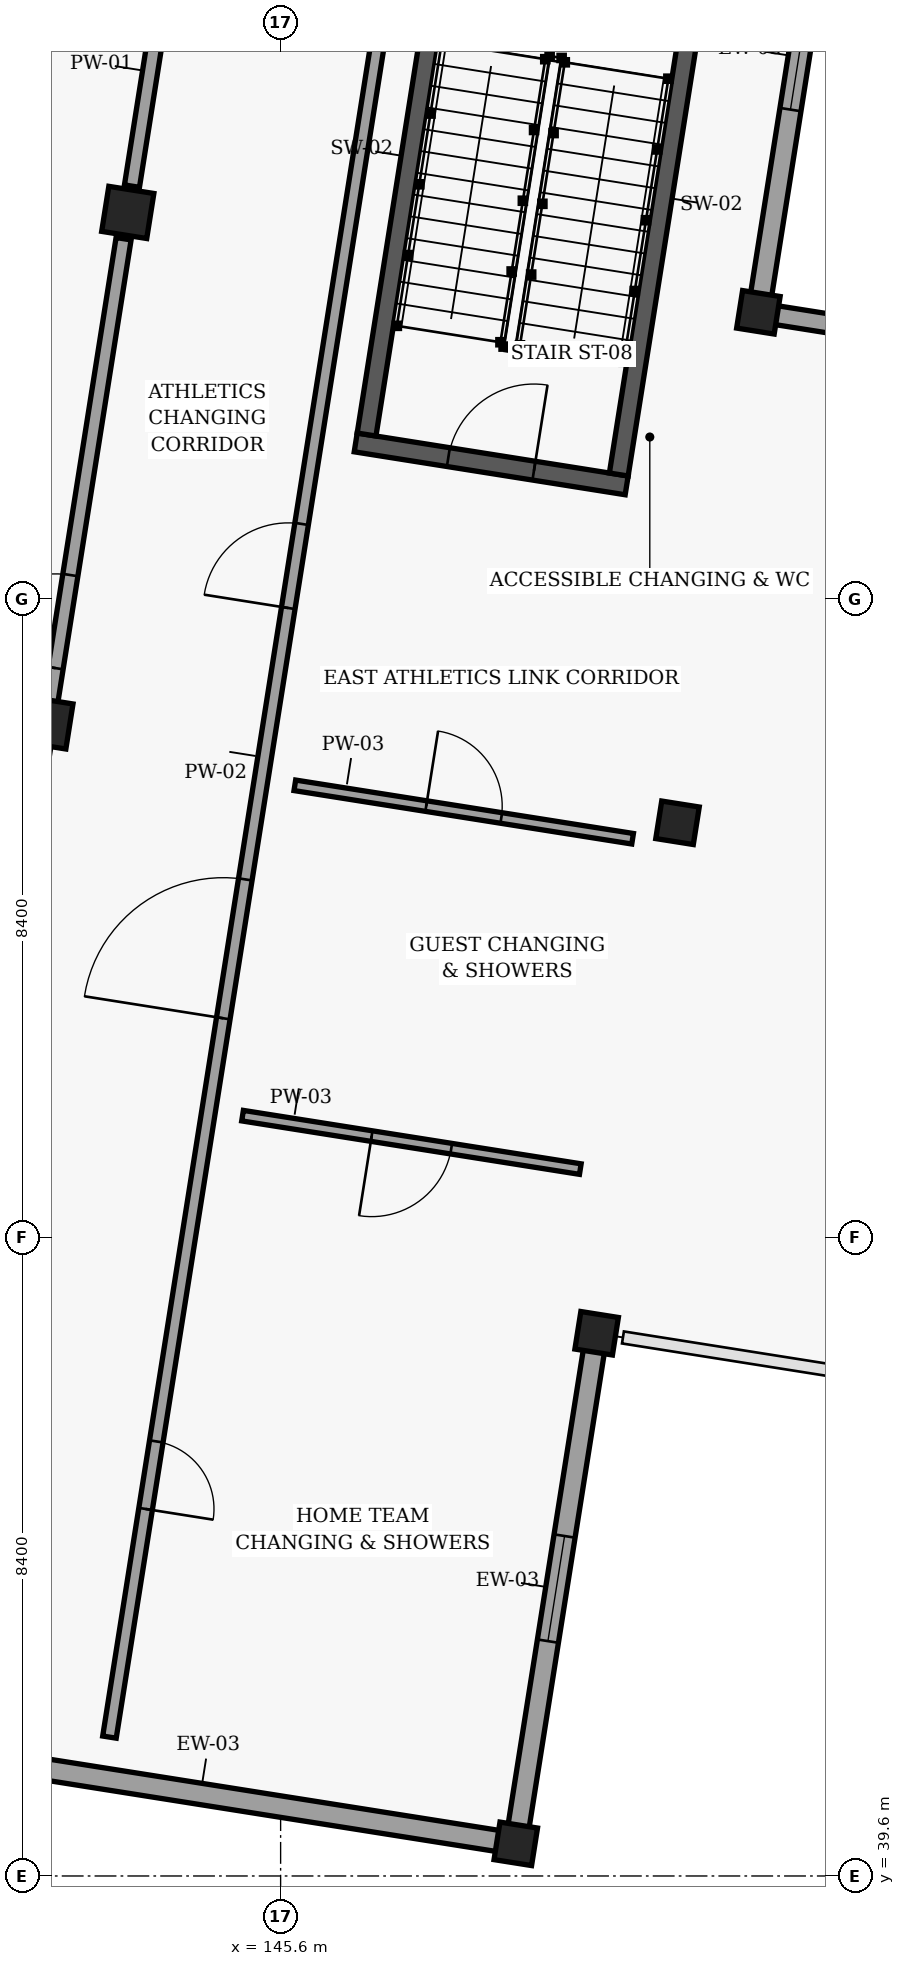
"""IFC4 building model, lengths in metres.
Left out: names, types, materials, properties, quantities, classifications, styles, units other than length and angle.
Written with IfcOpenShell. Run it as: python <this file> out.ifc"""

import sys

from ifc_helpers import new_model, si_unit, direction, frame, frame_2d, origin, origin_2d, place, context, subcontext, project, spatial, rectangle, extrude, element, fill, save


model = new_model("IFC4")
c1 = context("Model", 3, precision=1e-05, world=origin(), true_north=direction((0.0, 1.0)))
c2 = subcontext(c1, "Body", "Model", "MODEL_VIEW")
j1 = project(units=[si_unit("LENGTHUNIT", "METRE"), si_unit("PLANEANGLEUNIT", "RADIAN")], contexts=[c1])
p1 = place(None, origin())
s1 = spatial("IfcSite", under=j1, at=p1, CompositionType="ELEMENT")
p2 = place(p1, origin())
s2 = spatial("IfcBuilding", under=s1, at=p2, CompositionType="ELEMENT")
p3 = place(p2, origin())
s3 = spatial("IfcBuildingStorey", under=s2, at=p3, CompositionType="ELEMENT", Elevation=0.0)
for number, where, z_axis, x_axis in (
    (1, (142.525, 54.77, 0.0), (0.0, 0.0, 1.0), (0.988, -0.156, 0.0)),
    (2, (143.589, 61.486, 0.0), (0.0, 0.0, 1.0), (0.988, -0.156, 0.0)),
):
    element("IfcColumn", number, at=place(p3, frame(where, z_axis=z_axis, x_axis=x_axis)), inside=s3, PredefinedType="COLUMN", context=c2, shape_type="SweptSolid", body=[
        extrude(rectangle(XDim=0.6, YDim=0.6, at=origin_2d()), origin(), (0.0, 0.0, 1.0), 4.8),
    ])
for number, where, z_axis, x_axis in (
    (3, (148.694, 40.023, 0.0), (0.0, 0.0, 1.0), (0.988, -0.156, 0.0)),
    (4, (149.758, 46.74, 0.0), (0.0, 0.0, 1.0), (0.988, -0.156, 0.0)),
    (5, (150.822, 53.456, 0.0), (0.0, 0.0, 1.0), (0.988, -0.156, 0.0)),
    (6, (151.886, 60.172, 0.0), (0.0, 0.0, 1.0), (0.988, -0.156, 0.0)),
):
    element("IfcColumn", number, at=place(p3, frame(where, z_axis=z_axis, x_axis=x_axis)), inside=s3, PredefinedType="COLUMN", context=c2, shape_type="SweptSolid", body=[
        extrude(rectangle(XDim=0.5, YDim=0.5, at=origin_2d()), origin(), (0.0, 0.0, 1.0), 4.8),
    ])
p4 = place(p3, frame((148.71, 40.122, 0.0), z_axis=(0.0, 0.0, 1.0), x_axis=(0.156500089252, 0.987677944506, 0.0)))
e7 = element("IfcWall", 7, at=p4, inside=s3, PredefinedType="SOLIDWALL", context=c2, shape_type="SweptSolid", body=[
    extrude(rectangle(XDim=6.6, YDim=0.28, at=frame_2d((3.3, 0.0))), origin(), (0.0, 0.0, 1.0), 3.928),
])
p5 = place(p4, frame((2.6, 0.0, 1.35)))
e8 = element("IfcOpeningElement", 8, at=p5, cuts=e7, PredefinedType="OPENING", context=c2, shape_type="SweptSolid", body=[
    extrude(rectangle(XDim=1.4, YDim=1.2, at=frame_2d((0.7, 0.6))), frame((0.0, 0.15, 0.0), z_axis=(0.0, -1.0, 0.0), x_axis=(1.0, 0.0, 0.0)), (0.0, 0.0, 1.0), 0.3),
])
p6 = place(p3, frame((151.901, 60.271, 0.0), z_axis=(0.0, 0.0, 1.0), x_axis=(0.156536171909, 0.987672226442, 0.0)))
e9 = element("IfcWall", 9, at=p6, inside=s3, PredefinedType="SOLIDWALL", context=c2, shape_type="SweptSolid", body=[
    extrude(rectangle(XDim=6.6, YDim=0.28, at=frame_2d((3.3, 0.0))), origin(), (0.0, 0.0, 1.0), 3.928),
])
p7 = place(p6, frame((2.6, 0.0, 1.35)))
e10 = element("IfcOpeningElement", 10, at=p7, cuts=e9, PredefinedType="OPENING", context=c2, shape_type="SweptSolid", body=[
    extrude(rectangle(XDim=1.4, YDim=1.2, at=frame_2d((0.7, 0.6))), frame((0.0, 0.15, 0.0), z_axis=(0.0, -1.0, 0.0), x_axis=(1.0, 0.0, 0.0)), (0.0, 0.0, 1.0), 0.3),
])
p8 = place(p3, frame((140.477, 41.324, 0.0), z_axis=(0.0, 0.0, 1.0), x_axis=(0.98770403257, -0.156335357629, 0.0)))
e11 = element("IfcWall", 11, at=p8, inside=s3, PredefinedType="SOLIDWALL", context=c2, shape_type="SweptSolid", body=[
    extrude(rectangle(XDim=8.239, YDim=0.28, at=frame_2d((4.12, 0.0))), origin(), (0.0, 0.0, 1.0), 4.006),
])
p9 = place(p3, frame((151.965, 60.159, 0.0), z_axis=(0.0, 0.0, 1.0), x_axis=(0.987699982026, -0.156360946233, 0.0)))
e12 = element("IfcWall", 12, at=p9, inside=s3, PredefinedType="SOLIDWALL", context=c2, shape_type="SweptSolid", body=[
    extrude(rectangle(XDim=8.339, YDim=0.25, at=frame_2d((4.17, 0.0))), origin(), (0.0, 0.0, 1.0), 4.375),
])
p10 = place(p9, frame((1.98, 0.0, 0.9)))
e13 = element("IfcOpeningElement", 13, at=p10, cuts=e12, PredefinedType="OPENING", context=c2, shape_type="SweptSolid", body=[
    extrude(rectangle(XDim=1.6, YDim=2.1, at=frame_2d((0.8, 1.05))), frame((0.0, 0.135, 0.0), z_axis=(0.0, -1.0, 0.0), x_axis=(1.0, 0.0, 0.0)), (0.0, 0.0, 1.0), 0.27),
])
p11 = place(p9, frame((4.76, 0.0, 0.9)))
e14 = element("IfcOpeningElement", 14, at=p11, cuts=e12, PredefinedType="OPENING", context=c2, shape_type="SweptSolid", body=[
    extrude(rectangle(XDim=1.6, YDim=2.1, at=frame_2d((0.8, 1.05))), frame((0.0, 0.135, 0.0), z_axis=(0.0, -1.0, 0.0), x_axis=(1.0, 0.0, 0.0)), (0.0, 0.0, 1.0), 0.27),
])
p12 = place(p3, frame((150.153, 57.895, 0.0), z_axis=(0.0, 0.0, 1.0), x_axis=(-0.987676717047, 0.156507835599, 0.0)))
e15 = element("IfcWall", 15, at=p12, inside=s3, PredefinedType="SHEAR", context=c2, shape_type="SweptSolid", body=[
    extrude(rectangle(XDim=3.61, YDim=0.25, at=frame_2d((1.805, 0.0))), origin(), (0.0, 0.0, 1.0), 4.56),
])
p13 = place(p12, frame((1.235, 0.0, 0.0)))
e16 = element("IfcOpeningElement", 16, at=p13, cuts=e15, PredefinedType="OPENING", context=c2, shape_type="SweptSolid", body=[
    extrude(rectangle(XDim=1.14, YDim=2.15, at=frame_2d((0.57, 1.075))), frame((0.0, 0.135, 0.0), z_axis=(0.0, -1.0, 0.0), x_axis=(1.0, 0.0, 0.0)), (0.0, 0.0, 1.0), 0.27),
])
p14 = place(p3, frame((146.731, 58.564, 0.0), z_axis=(0.0, 0.0, 1.0), x_axis=(0.15642738738, 0.98768946156, 0.0)))
e17 = element("IfcWall", 17, at=p14, inside=s3, PredefinedType="SHEAR", context=c2, shape_type="SweptSolid", body=[
    extrude(rectangle(XDim=7.39, YDim=0.25, at=frame_2d((3.695, 0.0))), origin(), (0.0, 0.0, 1.0), 4.56),
])
p15 = place(p3, frame((151.205, 65.337, 0.0), z_axis=(0.0, 0.0, 1.0), x_axis=(-0.156432491725, -0.987688653136, 0.0)))
e18 = element("IfcWall", 18, at=p15, inside=s3, PredefinedType="SHEAR", context=c2, shape_type="SweptSolid", body=[
    extrude(rectangle(XDim=7.39, YDim=0.25, at=frame_2d((3.695, 0.0))), origin(), (0.0, 0.0, 1.0), 4.56),
])
p16 = place(p3, frame((141.517, 48.4, 0.0), z_axis=(0.0, 0.0, 1.0), x_axis=(0.156361063903, 0.987699963397, 0.0)))
e19 = element("IfcWall", 19, at=p16, inside=s3, PredefinedType="PARTITIONING", context=c2, shape_type="SweptSolid", body=[
    extrude(rectangle(XDim=12.899, YDim=0.2, at=frame_2d((6.449, 0.0))), origin(), (0.0, 0.0, 1.0), 3.928),
])
p17 = place(p16, frame((7.179, 0.0, 0.0)))
e20 = element("IfcOpeningElement", 20, at=p17, cuts=e19, PredefinedType="OPENING", context=c2, shape_type="SweptSolid", body=[
    extrude(rectangle(XDim=1.24, YDim=2.2, at=frame_2d((0.62, 1.1))), frame((0.0, 0.11, 0.0), z_axis=(0.0, -1.0, 0.0), x_axis=(1.0, 0.0, 0.0)), (0.0, 0.0, 1.0), 0.22),
])
p18 = place(p3, frame((143.644, 61.832, 0.0), z_axis=(0.0, 0.0, 1.0), x_axis=(0.156396286335, 0.987694386752, 0.0)))
e21 = element("IfcWall", 21, at=p18, inside=s3, PredefinedType="PARTITIONING", context=c2, shape_type="SweptSolid", body=[
    extrude(rectangle(XDim=6.099, YDim=0.2, at=frame_2d((3.049, 0.0))), origin(), (0.0, 0.0, 1.0), 3.928),
])
p19 = place(p18, frame((2.37, 0.0, 0.0)))
e22 = element("IfcOpeningElement", 22, at=p19, cuts=e21, PredefinedType="OPENING", context=c2, shape_type="SweptSolid", body=[
    extrude(rectangle(XDim=1.36, YDim=2.22, at=frame_2d((0.68, 1.11))), frame((0.0, 0.11, 0.0), z_axis=(0.0, -1.0, 0.0), x_axis=(1.0, 0.0, 0.0)), (0.0, 0.0, 1.0), 0.22),
])
p20 = place(p3, frame((143.348, 41.427, 0.0), z_axis=(0.0, 0.0, 1.0), x_axis=(0.156440506918, 0.987687383637, 0.0)))
e23 = element("IfcWall", 23, at=p20, inside=s3, PredefinedType="PARTITIONING", context=c2, shape_type="SweptSolid", body=[
    extrude(rectangle(XDim=26.099, YDim=0.18, at=frame_2d((13.05, 0.0))), origin(), (0.0, 0.0, 1.0), 4.006),
])
p21 = place(p20, frame((9.575, 0.0, 0.0)))
e24 = element("IfcOpeningElement", 24, at=p21, cuts=e23, PredefinedType="OPENING", context=c2, shape_type="SweptSolid", body=[
    extrude(rectangle(XDim=1.85, YDim=2.22, at=frame_2d((0.925, 1.11))), frame((0.0, 0.1, 0.0), z_axis=(0.0, -1.0, 0.0), x_axis=(1.0, 0.0, 0.0)), (0.0, 0.0, 1.0), 0.2),
])
p22 = place(p20, frame((15.04, 0.0, 0.0)))
e25 = element("IfcOpeningElement", 25, at=p22, cuts=e23, PredefinedType="OPENING", context=c2, shape_type="SweptSolid", body=[
    extrude(rectangle(XDim=1.12, YDim=2.16, at=frame_2d((0.56, 1.08))), frame((0.0, 0.1, 0.0), z_axis=(0.0, -1.0, 0.0), x_axis=(1.0, 0.0, 0.0)), (0.0, 0.0, 1.0), 0.2),
])
p23 = place(p20, frame((3.039, 0.0, 0.0)))
e26 = element("IfcOpeningElement", 26, at=p23, cuts=e23, PredefinedType="OPENING", context=c2, shape_type="SweptSolid", body=[
    extrude(rectangle(XDim=0.9, YDim=2.06, at=frame_2d((0.45, 1.03))), frame((0.0, 0.1, 0.0), z_axis=(0.0, -1.0, 0.0), x_axis=(1.0, 0.0, 0.0)), (0.0, 0.0, 1.0), 0.2),
])
p24 = place(p20, frame((23.161, 0.0, 0.0)))
e27 = element("IfcOpeningElement", 27, at=p24, cuts=e23, PredefinedType="OPENING", context=c2, shape_type="SweptSolid", body=[
    extrude(rectangle(XDim=0.9, YDim=2.06, at=frame_2d((0.45, 1.03))), frame((0.0, 0.1, 0.0), z_axis=(0.0, -1.0, 0.0), x_axis=(1.0, 0.0, 0.0)), (0.0, 0.0, 1.0), 0.2),
])
p25 = place(p3, frame((145.099, 49.603, 0.0), z_axis=(0.0, 0.0, 1.0), x_axis=(0.987712756743, -0.156280229613, 0.0)))
e28 = element("IfcWall", 28, at=p25, inside=s3, PredefinedType="PARTITIONING", context=c2, shape_type="SweptSolid", body=[
    extrude(rectangle(XDim=4.499, YDim=0.14, at=frame_2d((2.25, 0.0))), origin(), (0.0, 0.0, 1.0), 4.135),
])
p26 = place(p25, frame((1.72, 0.0, 0.0)))
e29 = element("IfcOpeningElement", 29, at=p26, cuts=e28, PredefinedType="OPENING", context=c2, shape_type="SweptSolid", body=[
    extrude(rectangle(XDim=1.06, YDim=2.16, at=frame_2d((0.53, 1.08))), frame((0.0, 0.08, 0.0), z_axis=(0.0, -1.0, 0.0), x_axis=(1.0, 0.0, 0.0)), (0.0, 0.0, 1.0), 0.16),
])
p27 = place(p3, frame((145.787, 53.949, 0.0), z_axis=(0.0, 0.0, 1.0), x_axis=(0.98772113158, -0.156227290288, 0.0)))
e30 = element("IfcWall", 30, at=p27, inside=s3, PredefinedType="PARTITIONING", context=c2, shape_type="SweptSolid", body=[
    extrude(rectangle(XDim=4.499, YDim=0.14, at=frame_2d((2.25, 0.0))), origin(), (0.0, 0.0, 1.0), 4.135),
])
p28 = place(p27, frame((1.75, 0.0, 0.0)))
e31 = element("IfcOpeningElement", 31, at=p28, cuts=e30, PredefinedType="OPENING", context=c2, shape_type="SweptSolid", body=[
    extrude(rectangle(XDim=1.0, YDim=2.14, at=frame_2d((0.5, 1.07))), frame((0.0, 0.08, 0.0), z_axis=(0.0, -1.0, 0.0), x_axis=(1.0, 0.0, 0.0)), (0.0, 0.0, 1.0), 0.16),
])
p29 = place(p5, origin())
e32 = element("IfcWindow", 32, at=p29, inside=s3, PartitioningType="SINGLE_PANEL", PredefinedType="WINDOW", context=c2, shape_type="SweptSolid", body=[
    extrude(rectangle(XDim=1.4, YDim=1.2, at=frame_2d((0.7, 0.6))), frame((0.0, 0.03, 0.0), z_axis=(0.0, -1.0, 0.0), x_axis=(1.0, 0.0, 0.0)), (0.0, 0.0, 1.0), 0.06),
])
fill(e8, e32)
p30 = place(p7, origin())
e33 = element("IfcWindow", 33, at=p30, inside=s3, PartitioningType="SINGLE_PANEL", PredefinedType="WINDOW", context=c2, shape_type="SweptSolid", body=[
    extrude(rectangle(XDim=1.4, YDim=1.2, at=frame_2d((0.7, 0.6))), frame((0.0, 0.03, 0.0), z_axis=(0.0, -1.0, 0.0), x_axis=(1.0, 0.0, 0.0)), (0.0, 0.0, 1.0), 0.06),
])
fill(e10, e33)
p31 = place(p13, origin())
e34 = element("IfcDoor", 34, at=p31, inside=s3, OperationType="SINGLE_SWING_RIGHT", PredefinedType="DOOR", context=c2, shape_type="SweptSolid", body=[
    extrude(rectangle(XDim=1.14, YDim=2.15, at=frame_2d((0.57, 1.075))), frame((0.0, 0.025, 0.0), z_axis=(0.0, -1.0, 0.0), x_axis=(1.0, 0.0, 0.0)), (0.0, 0.0, 1.0), 0.05),
])
fill(e16, e34)
p32 = place(p17, origin())
e35 = element("IfcDoor", 35, at=p32, inside=s3, OperationType="SINGLE_SWING_LEFT", PredefinedType="DOOR", context=c2, shape_type="SweptSolid", body=[
    extrude(rectangle(XDim=1.24, YDim=2.2, at=frame_2d((0.62, 1.1))), frame((0.0, 0.025, 0.0), z_axis=(0.0, -1.0, 0.0), x_axis=(1.0, 0.0, 0.0)), (0.0, 0.0, 1.0), 0.05),
])
fill(e20, e35)
p33 = place(p21, origin())
e36 = element("IfcDoor", 36, at=p33, inside=s3, OperationType="DOUBLE_DOOR_SINGLE_SWING", PredefinedType="DOOR", context=c2, shape_type="SweptSolid", body=[
    extrude(rectangle(XDim=1.85, YDim=2.22, at=frame_2d((0.925, 1.11))), frame((0.0, 0.025, 0.0), z_axis=(0.0, -1.0, 0.0), x_axis=(1.0, 0.0, 0.0)), (0.0, 0.0, 1.0), 0.05),
])
fill(e24, e36)
p34 = place(p22, origin())
e37 = element("IfcDoor", 37, at=p34, inside=s3, OperationType="SINGLE_SWING_LEFT", PredefinedType="DOOR", context=c2, shape_type="SweptSolid", body=[
    extrude(rectangle(XDim=1.12, YDim=2.16, at=frame_2d((0.56, 1.08))), frame((0.0, 0.025, 0.0), z_axis=(0.0, -1.0, 0.0), x_axis=(1.0, 0.0, 0.0)), (0.0, 0.0, 1.0), 0.05),
])
fill(e25, e37)
p35 = place(p26, origin())
e38 = element("IfcDoor", 38, at=p35, inside=s3, OperationType="SINGLE_SWING_RIGHT", PredefinedType="DOOR", context=c2, shape_type="SweptSolid", body=[
    extrude(rectangle(XDim=1.06, YDim=2.16, at=frame_2d((0.53, 1.08))), frame((0.0, 0.025, 0.0), z_axis=(0.0, -1.0, 0.0), x_axis=(1.0, 0.0, 0.0)), (0.0, 0.0, 1.0), 0.05),
])
fill(e29, e38)
p36 = place(p28, origin())
e39 = element("IfcDoor", 39, at=p36, inside=s3, OperationType="SINGLE_SWING_LEFT", PredefinedType="DOOR", context=c2, shape_type="SweptSolid", body=[
    extrude(rectangle(XDim=1.0, YDim=2.14, at=frame_2d((0.5, 1.07))), frame((0.0, 0.025, 0.0), z_axis=(0.0, -1.0, 0.0), x_axis=(1.0, 0.0, 0.0)), (0.0, 0.0, 1.0), 0.05),
])
fill(e31, e39)
p37 = place(p23, origin())
e40 = element("IfcDoor", 40, at=p37, inside=s3, OperationType="SINGLE_SWING_RIGHT", PredefinedType="DOOR", context=c2, shape_type="SweptSolid", body=[
    extrude(rectangle(XDim=0.9, YDim=2.06, at=frame_2d((0.45, 1.03))), frame((0.0, 0.025, 0.0), z_axis=(0.0, -1.0, 0.0), x_axis=(1.0, 0.0, 0.0)), (0.0, 0.0, 1.0), 0.05),
])
fill(e26, e40)
save(model, sys.argv[1])
